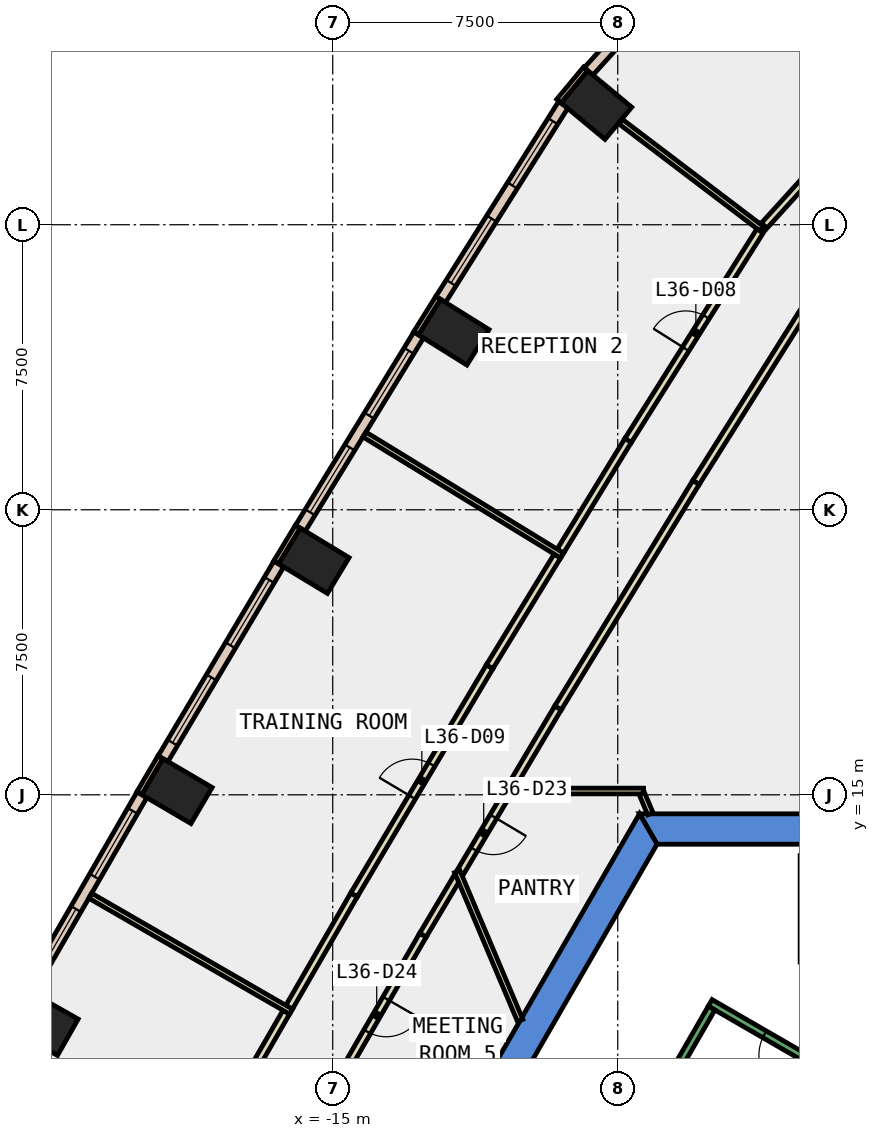
"""IFC4 building model, lengths in metres.
Left out: names, types, materials, properties, quantities, classifications, styles, units other than length and angle.
Written with IfcOpenShell. Run it as: python <this file> out.ifc"""

import sys

from ifc_helpers import new_model, si_unit, direction, frame, frame_2d, origin, origin_2d, place, context, subcontext, project, spatial, polyline, rectangle, outline, extrude, element, fill, save


model = new_model("IFC4")
c1 = context("Model", 3, precision=1e-05, world=origin(), true_north=direction((0.0, 1.0)))
c2 = subcontext(c1, "Body", "Model", "MODEL_VIEW")
j1 = project(units=[si_unit("LENGTHUNIT", "METRE"), si_unit("PLANEANGLEUNIT", "RADIAN")], contexts=[c1])
p1 = place(None, origin())
s1 = spatial("IfcSite", under=j1, at=p1, CompositionType="ELEMENT")
p2 = place(p1, origin())
s2 = spatial("IfcBuilding", under=s1, at=p2, CompositionType="ELEMENT")
p3 = place(p2, frame((0.0, 0.0, 163.4)))
s3 = spatial("IfcBuildingStorey", under=s2, at=p3, CompositionType="ELEMENT", Elevation=163.4)
for number, where, z_axis, x_axis in (
    (1, (-8.061, 33.149, -0.4), (0.0, 0.0, 1.0), (0.639, 0.769, 0.0)),
    (2, (-11.815, 27.172, -0.4), (0.0, 0.0, 1.0), (0.53, 0.848, 0.0)),
    (3, (-15.496, 21.158, -0.4), (0.0, 0.0, 1.0), (0.518, 0.855, 0.0)),
    (4, (-19.099, 15.098, -0.4), (0.0, 0.0, 1.0), (0.506, 0.863, 0.0)),
    (5, (-22.623, 8.991, -0.4), (0.0, 0.0, 1.0), (0.494, 0.869, 0.0)),
):
    element("IfcColumn", number, at=place(p3, frame(where, z_axis=z_axis, x_axis=x_axis)), inside=s3, PredefinedType="COLUMN", context=c2, shape_type="SweptSolid", body=[
        extrude(rectangle(XDim=1.1, YDim=1.5, at=origin_2d()), origin(), (0.0, 0.0, 1.0), 4.2),
    ])
p4 = place(p3, frame((0.0, 0.0, -0.4)))
e6 = element("IfcWall", 6, at=p4, inside=s3, PredefinedType="SHEAR", context=c2, shape_type="SweptSolid", body=[
    extrude(outline(polyline([(6.928, 14.5), (-6.928, 14.5), (-6.466, 13.7), (6.466, 13.7), (6.928, 14.5)])), origin(), (0.0, 0.0, 1.0), 4.2),
])
p5 = place(p3, frame((0.0, 0.0, -0.4)))
e7 = element("IfcWall", 7, at=p5, inside=s3, PredefinedType="SHEAR", context=c2, shape_type="SweptSolid", body=[
    extrude(outline(polyline([(-12.267, 5.252), (-11.575, 4.852), (-6.466, 13.7), (-6.928, 14.5), (-12.267, 5.252)])), origin(), (0.0, 0.0, 1.0), 4.2),
])
for number, where, z_axis, x_axis in (
    (8, (-8.344, 34.099, 0.0), (0.0, 0.0, 1.0), (-0.639, -0.769, 0.0)),
    (9, (-12.223, 28.076, 0.0), (0.0, 0.0, 1.0), (-0.53, -0.848, 0.0)),
    (10, (-15.917, 22.056, 0.0), (0.0, 0.0, 1.0), (-0.518, -0.855, 0.0)),
):
    element("IfcWall", number, at=place(p3, frame(where, z_axis=z_axis, x_axis=x_axis)), inside=s3, PredefinedType="STANDARD", context=c2, shape_type="SweptSolid", body=[
        extrude(rectangle(XDim=1.1, YDim=0.15, at=frame_2d((0.55, 0.0))), origin(), (0.0, 0.0, 1.0), 3.8),
    ])
p6 = place(p3, frame((-19.532, 15.989, 0.0), z_axis=(0.0, 0.0, 1.0), x_axis=(-0.50667077411, -0.862139621327, 0.0)))
e11 = element("IfcWall", 11, at=p6, inside=s3, PredefinedType="STANDARD", context=c2, shape_type="SweptSolid", body=[
    extrude(rectangle(XDim=1.1, YDim=0.15, at=frame_2d((0.55, 0.0))), origin(), (0.0, 0.0, 1.0), 3.8),
])
p7 = place(p3, frame((-5.568, 37.01, 0.0), z_axis=(0.0, 0.0, 1.0), x_axis=(-0.672034341329, -0.740519982225, 0.0)))
e12 = element("IfcWall", 12, at=p7, inside=s3, PredefinedType="STANDARD", context=c2, shape_type="SweptSolid", body=[
    extrude(rectangle(XDim=4.018, YDim=0.3, at=frame_2d((2.009, 0.0))), origin(), (0.0, 0.0, 1.0), 3.8),
])
p8 = place(p7, frame((1.309, 0.0, 0.9)))
e13 = element("IfcOpeningElement", 13, at=p8, cuts=e12, PredefinedType="OPENING", context=c2, shape_type="SweptSolid", body=[
    extrude(rectangle(XDim=1.4, YDim=2.6, at=frame_2d((0.7, 1.3))), frame((0.0, 0.16, 0.0), z_axis=(0.0, -1.0, 0.0), x_axis=(1.0, 0.0, 0.0)), (0.0, 0.0, 1.0), 0.32),
])
p9 = place(p3, frame((-8.932, 33.159, 0.0), z_axis=(0.0, 0.0, 1.0), x_axis=(-0.532721310512, -0.846290733334, 0.0)))
e14 = element("IfcWall", 14, at=p9, inside=s3, PredefinedType="STANDARD", context=c2, shape_type="SweptSolid", body=[
    extrude(rectangle(XDim=6.056, YDim=0.3, at=frame_2d((3.028, 0.0))), origin(), (0.0, 0.0, 1.0), 3.8),
])
p10 = place(p9, frame((0.514, 0.0, 0.9)))
e15 = element("IfcOpeningElement", 15, at=p10, cuts=e14, PredefinedType="OPENING", context=c2, shape_type="SweptSolid", body=[
    extrude(rectangle(XDim=2.0, YDim=2.6, at=frame_2d((1.0, 1.3))), frame((0.0, 0.16, 0.0), z_axis=(0.0, -1.0, 0.0), x_axis=(1.0, 0.0, 0.0)), (0.0, 0.0, 1.0), 0.32),
])
p11 = place(p9, frame((3.542, 0.0, 0.9)))
e16 = element("IfcOpeningElement", 16, at=p11, cuts=e14, PredefinedType="OPENING", context=c2, shape_type="SweptSolid", body=[
    extrude(rectangle(XDim=2.0, YDim=2.6, at=frame_2d((1.0, 1.3))), frame((0.0, 0.16, 0.0), z_axis=(0.0, -1.0, 0.0), x_axis=(1.0, 0.0, 0.0)), (0.0, 0.0, 1.0), 0.32),
])
p12 = place(p3, frame((-12.737, 27.101, 0.0), z_axis=(0.0, 0.0, 1.0), x_axis=(-0.522156898008, -0.852849443842, 0.0)))
e17 = element("IfcWall", 17, at=p12, inside=s3, PredefinedType="STANDARD", context=c2, shape_type="SweptSolid", body=[
    extrude(rectangle(XDim=5.964, YDim=0.3, at=frame_2d((2.982, 0.0))), origin(), (0.0, 0.0, 1.0), 3.8),
])
p13 = place(p12, frame((0.491, 0.0, 0.9)))
e18 = element("IfcOpeningElement", 18, at=p13, cuts=e17, PredefinedType="OPENING", context=c2, shape_type="SweptSolid", body=[
    extrude(rectangle(XDim=2.0, YDim=2.6, at=frame_2d((1.0, 1.3))), frame((0.0, 0.16, 0.0), z_axis=(0.0, -1.0, 0.0), x_axis=(1.0, 0.0, 0.0)), (0.0, 0.0, 1.0), 0.32),
])
p14 = place(p12, frame((3.473, 0.0, 0.9)))
e19 = element("IfcOpeningElement", 19, at=p14, cuts=e17, PredefinedType="OPENING", context=c2, shape_type="SweptSolid", body=[
    extrude(rectangle(XDim=2.0, YDim=2.6, at=frame_2d((1.0, 1.3))), frame((0.0, 0.16, 0.0), z_axis=(0.0, -1.0, 0.0), x_axis=(1.0, 0.0, 0.0)), (0.0, 0.0, 1.0), 0.32),
])
p15 = place(p3, frame((-16.418, 21.074, 0.0), z_axis=(0.0, 0.0, 1.0), x_axis=(-0.511053317394, -0.8595490136, 0.0)))
e20 = element("IfcWall", 20, at=p15, inside=s3, PredefinedType="STANDARD", context=c2, shape_type="SweptSolid", body=[
    extrude(rectangle(XDim=5.962, YDim=0.3, at=frame_2d((2.981, 0.0))), origin(), (0.0, 0.0, 1.0), 3.8),
])
p16 = place(p15, frame((0.491, 0.0, 0.9)))
e21 = element("IfcOpeningElement", 21, at=p16, cuts=e20, PredefinedType="OPENING", context=c2, shape_type="SweptSolid", body=[
    extrude(rectangle(XDim=2.0, YDim=2.6, at=frame_2d((1.0, 1.3))), frame((0.0, 0.16, 0.0), z_axis=(0.0, -1.0, 0.0), x_axis=(1.0, 0.0, 0.0)), (0.0, 0.0, 1.0), 0.32),
])
p17 = place(p15, frame((3.472, 0.0, 0.9)))
e22 = element("IfcOpeningElement", 22, at=p17, cuts=e20, PredefinedType="OPENING", context=c2, shape_type="SweptSolid", body=[
    extrude(rectangle(XDim=2.0, YDim=2.6, at=frame_2d((1.0, 1.3))), frame((0.0, 0.16, 0.0), z_axis=(0.0, -1.0, 0.0), x_axis=(1.0, 0.0, 0.0)), (0.0, 0.0, 1.0), 0.32),
])
p18 = place(p3, frame((-20.02, 15.002, 0.0), z_axis=(0.0, 0.0, 1.0), x_axis=(-0.49986421087, -0.866103787482, 0.0)))
e23 = element("IfcWall", 23, at=p18, inside=s3, PredefinedType="STANDARD", context=c2, shape_type="SweptSolid", body=[
    extrude(rectangle(XDim=5.964, YDim=0.3, at=frame_2d((2.982, 0.0))), origin(), (0.0, 0.0, 1.0), 3.8),
])
p19 = place(p18, frame((0.491, 0.0, 0.9)))
e24 = element("IfcOpeningElement", 24, at=p19, cuts=e23, PredefinedType="OPENING", context=c2, shape_type="SweptSolid", body=[
    extrude(rectangle(XDim=2.0, YDim=2.6, at=frame_2d((1.0, 1.3))), frame((0.0, 0.16, 0.0), z_axis=(0.0, -1.0, 0.0), x_axis=(1.0, 0.0, 0.0)), (0.0, 0.0, 1.0), 0.32),
])
p20 = place(p18, frame((3.473, 0.0, 0.9)))
e25 = element("IfcOpeningElement", 25, at=p20, cuts=e23, PredefinedType="OPENING", context=c2, shape_type="SweptSolid", body=[
    extrude(rectangle(XDim=2.0, YDim=2.6, at=frame_2d((1.0, 1.3))), frame((0.0, 0.16, 0.0), z_axis=(0.0, -1.0, 0.0), x_axis=(1.0, 0.0, 0.0)), (0.0, 0.0, 1.0), 0.32),
])
p21 = place(p3, frame((-10.41, 15.036, 0.0), z_axis=(0.0, 0.0, 1.0), x_axis=(-0.510900085603, -0.859640100583, 0.0)))
e26 = element("IfcWall", 26, at=p21, inside=s3, PredefinedType="PARTITIONING", context=c2, shape_type="SweptSolid", body=[
    extrude(rectangle(XDim=2.419, YDim=0.2, at=frame_2d((1.21, 0.0))), origin(), (0.0, 0.0, 1.0), 3.8),
])
p22 = place(p21, frame((0.709, 0.0, 0.0)))
e27 = element("IfcOpeningElement", 27, at=p22, cuts=e26, PredefinedType="OPENING", context=c2, shape_type="SweptSolid", body=[
    extrude(rectangle(XDim=1.0, YDim=2.1, at=frame_2d((0.5, 1.05))), frame((0.0, 0.11, 0.0), z_axis=(0.0, -1.0, 0.0), x_axis=(1.0, 0.0, 0.0)), (0.0, 0.0, 1.0), 0.22),
])
p23 = place(p3, frame((-11.723, 12.827, 0.0), z_axis=(0.0, 0.0, 1.0), x_axis=(-0.511182890129, -0.859471961637, 0.0)))
e28 = element("IfcWall", 28, at=p23, inside=s3, PredefinedType="PARTITIONING", context=c2, shape_type="SweptSolid", body=[
    extrude(rectangle(XDim=1.769, YDim=0.2, at=frame_2d((0.884, 0.0))), origin(), (0.0, 0.0, 1.0), 3.8),
])
p24 = place(p3, frame((-12.627, 11.307, 0.0), z_axis=(0.0, 0.0, 1.0), x_axis=(-0.499907870494, -0.866078588246, 0.0)))
e29 = element("IfcWall", 29, at=p24, inside=s3, PredefinedType="PARTITIONING", context=c2, shape_type="SweptSolid", body=[
    extrude(rectangle(XDim=4.863, YDim=0.2, at=frame_2d((2.432, 0.0))), origin(), (0.0, 0.0, 1.0), 3.8),
])
p25 = place(p24, frame((1.932, 0.0, 0.0)))
e30 = element("IfcOpeningElement", 30, at=p25, cuts=e29, PredefinedType="OPENING", context=c2, shape_type="SweptSolid", body=[
    extrude(rectangle(XDim=1.0, YDim=2.1, at=frame_2d((0.5, 1.05))), frame((0.0, 0.11, 0.0), z_axis=(0.0, -1.0, 0.0), x_axis=(1.0, 0.0, 0.0)), (0.0, 0.0, 1.0), 0.22),
])
p26 = place(p3, frame((-1.984, 28.709, 0.0), z_axis=(0.0, 0.0, 1.0), x_axis=(-0.532786324951, -0.846249804694, 0.0)))
e31 = element("IfcWall", 31, at=p26, inside=s3, PredefinedType="PARTITIONING", context=c2, shape_type="SweptSolid", body=[
    extrude(rectangle(XDim=6.489, YDim=0.2, at=frame_2d((3.244, 0.0))), origin(), (0.0, 0.0, 1.0), 3.8),
])
p27 = place(p3, frame((-5.441, 23.218, 0.0), z_axis=(0.0, 0.0, 1.0), x_axis=(-0.522108536257, -0.85287905143, 0.0)))
e32 = element("IfcWall", 32, at=p27, inside=s3, PredefinedType="PARTITIONING", context=c2, shape_type="SweptSolid", body=[
    extrude(rectangle(XDim=6.957, YDim=0.2, at=frame_2d((3.478, 0.0))), origin(), (0.0, 0.0, 1.0), 3.8),
])
p28 = place(p3, frame((-9.073, 17.285, 0.0), z_axis=(0.0, 0.0, 1.0), x_axis=(-0.51105761127, -0.859546460619, 0.0)))
e33 = element("IfcWall", 33, at=p28, inside=s3, PredefinedType="PARTITIONING", context=c2, shape_type="SweptSolid", body=[
    extrude(rectangle(XDim=2.467, YDim=0.2, at=frame_2d((1.234, 0.0))), origin(), (0.0, 0.0, 1.0), 3.8),
])
p29 = place(p3, frame((-3.649, 29.973, 0.0), z_axis=(0.0, 0.0, 1.0), x_axis=(0.671957285765, 0.740589904135, 0.0)))
e34 = element("IfcWall", 34, at=p29, inside=s3, PredefinedType="PARTITIONING", context=c2, shape_type="SweptSolid", body=[
    extrude(rectangle(XDim=2.888, YDim=0.2, at=frame_2d((1.444, 0.0))), origin(), (0.0, 0.0, 1.0), 3.8),
])
p30 = place(p3, frame((-9.01, 21.411, 0.0), z_axis=(0.0, 0.0, 1.0), x_axis=(0.52198736623, 0.852953216476, 0.0)))
e35 = element("IfcWall", 35, at=p30, inside=s3, PredefinedType="PARTITIONING", context=c2, shape_type="SweptSolid", body=[
    extrude(rectangle(XDim=3.417, YDim=0.2, at=frame_2d((1.709, 0.0))), origin(), (0.0, 0.0, 1.0), 3.8),
])
p31 = place(p3, frame((-7.226, 24.326, 0.0), z_axis=(0.0, 0.0, 1.0), x_axis=(0.532874279134, 0.846194423662, 0.0)))
e36 = element("IfcWall", 36, at=p31, inside=s3, PredefinedType="PARTITIONING", context=c2, shape_type="SweptSolid", body=[
    extrude(rectangle(XDim=6.686, YDim=0.2, at=frame_2d((3.343, 0.0))), origin(), (0.0, 0.0, 1.0), 3.8),
])
p32 = place(p31, frame((2.843, 0.0, 0.0)))
e37 = element("IfcOpeningElement", 37, at=p32, cuts=e36, PredefinedType="OPENING", context=c2, shape_type="SweptSolid", body=[
    extrude(rectangle(XDim=1.0, YDim=2.1, at=frame_2d((0.5, 1.05))), frame((0.0, 0.11, 0.0), z_axis=(0.0, -1.0, 0.0), x_axis=(1.0, 0.0, 0.0)), (0.0, 0.0, 1.0), 0.22),
])
p33 = place(p3, frame((-16.147, 9.41, 0.0), z_axis=(0.0, 0.0, 1.0), x_axis=(0.500044178772, 0.865999895656, 0.0)))
e38 = element("IfcWall", 38, at=p33, inside=s3, PredefinedType="PARTITIONING", context=c2, shape_type="SweptSolid", body=[
    extrude(rectangle(XDim=3.416, YDim=0.2, at=frame_2d((1.708, 0.0))), origin(), (0.0, 0.0, 1.0), 3.8),
])
p34 = place(p3, frame((-14.439, 12.368, 0.0), z_axis=(0.0, 0.0, 1.0), x_axis=(0.51096926939, 0.859598979606, 0.0)))
e39 = element("IfcWall", 39, at=p34, inside=s3, PredefinedType="PARTITIONING", context=c2, shape_type="SweptSolid", body=[
    extrude(rectangle(XDim=6.983, YDim=0.2, at=frame_2d((3.491, 0.0))), origin(), (0.0, 0.0, 1.0), 3.8),
])
p35 = place(p34, frame((2.991, 0.0, 0.0)))
e40 = element("IfcOpeningElement", 40, at=p35, cuts=e39, PredefinedType="OPENING", context=c2, shape_type="SweptSolid", body=[
    extrude(rectangle(XDim=1.0, YDim=2.1, at=frame_2d((0.5, 1.05))), frame((0.0, 0.11, 0.0), z_axis=(0.0, -1.0, 0.0), x_axis=(1.0, 0.0, 0.0)), (0.0, 0.0, 1.0), 0.22),
])
p36 = place(p3, frame((-10.871, 18.37, 0.0), z_axis=(0.0, 0.0, 1.0), x_axis=(0.522117781608, 0.852873391617, 0.0)))
e41 = element("IfcWall", 41, at=p36, inside=s3, PredefinedType="PARTITIONING", context=c2, shape_type="SweptSolid", body=[
    extrude(rectangle(XDim=3.415, YDim=0.2, at=frame_2d((1.708, 0.0))), origin(), (0.0, 0.0, 1.0), 3.8),
])
p37 = place(p3, frame((-17.93, 6.321, 0.0), z_axis=(0.0, 0.0, 1.0), x_axis=(0.499920397431, 0.866071357471, 0.0)))
e42 = element("IfcWall", 42, at=p37, inside=s3, PredefinedType="PARTITIONING", context=c2, shape_type="SweptSolid", body=[
    extrude(rectangle(XDim=3.417, YDim=0.2, at=frame_2d((1.708, 0.0))), origin(), (0.0, 0.0, 1.0), 3.8),
])
p38 = place(p3, frame((-10.068, 9.062, 0.0), z_axis=(0.0, 0.0, 1.0), x_axis=(-0.388992587102, 0.921240884448, 0.0)))
e43 = element("IfcWall", 43, at=p38, inside=s3, PredefinedType="PARTITIONING", context=c2, shape_type="SweptSolid", body=[
    extrude(rectangle(XDim=4.257, YDim=0.15, at=frame_2d((2.128, 0.0))), origin(), (0.0, 0.0, 1.0), 3.8),
])
p39 = place(p3, frame((-6.82, 15.1, 0.0), z_axis=(0.0, 0.0, 1.0), x_axis=(-1.0, 0.0, 0.0)))
e44 = element("IfcWall", 44, at=p39, inside=s3, PredefinedType="PARTITIONING", context=c2, shape_type="SweptSolid", body=[
    extrude(rectangle(XDim=3.652, YDim=0.15, at=frame_2d((1.826, 0.0))), origin(), (0.0, 0.0, 1.0), 3.8),
])
p40 = place(p3, frame((-6.641, 14.5, 0.0), z_axis=(0.0, 0.0, 1.0), x_axis=(-0.389930013825, 0.920844495188, 0.0)))
e45 = element("IfcWall", 45, at=p40, inside=s3, PredefinedType="PARTITIONING", context=c2, shape_type="SweptSolid", body=[
    extrude(rectangle(XDim=0.577, YDim=0.15, at=frame_2d((0.288, 0.0))), origin(), (0.0, 0.0, 1.0), 3.8),
])
p41 = place(p3, frame((-3.716, 29.899, 0.0), z_axis=(0.0, 0.0, 1.0), x_axis=(-0.796435085709, 0.604724031481, 0.0)))
e46 = element("IfcWall", 46, at=p41, inside=s3, PredefinedType="PARTITIONING", context=c2, shape_type="SweptSolid", body=[
    extrude(rectangle(XDim=4.653, YDim=0.15, at=frame_2d((2.327, 0.0))), origin(), (0.0, 0.0, 1.0), 3.8),
])
p42 = place(p3, frame((-8.964, 21.295, 0.0), z_axis=(0.0, 0.0, 1.0), x_axis=(-0.852835298101, 0.522180001832, 0.0)))
e47 = element("IfcWall", 47, at=p42, inside=s3, PredefinedType="PARTITIONING", context=c2, shape_type="SweptSolid", body=[
    extrude(rectangle(XDim=6.1, YDim=0.15, at=frame_2d((3.05, 0.0))), origin(), (0.0, 0.0, 1.0), 3.8),
])
p43 = place(p3, frame((-16.098, 9.295, 0.0), z_axis=(0.0, 0.0, 1.0), x_axis=(-0.866109615698, 0.499854112313, 0.0)))
e48 = element("IfcWall", 48, at=p43, inside=s3, PredefinedType="PARTITIONING", context=c2, shape_type="SweptSolid", body=[
    extrude(rectangle(XDim=6.1, YDim=0.15, at=frame_2d((3.05, 0.0))), origin(), (0.0, 0.0, 1.0), 3.8),
])
p44 = place(p3, frame((-1.256, 7.324, 0.0), z_axis=(0.0, 0.0, 1.0), x_axis=(-0.866046073146, 0.499964197906, 0.0)))
e49 = element("IfcWall", 49, at=p44, inside=s3, PredefinedType="STANDARD", context=c2, shape_type="SweptSolid", body=[
    extrude(rectangle(XDim=4.4, YDim=0.2, at=frame_2d((2.2, 0.0))), origin(), (0.0, 0.0, 1.0), 3.8),
])
p45 = place(p44, frame((1.65, 0.0, 0.0)))
e50 = element("IfcOpeningElement", 50, at=p45, cuts=e49, PredefinedType="OPENING", context=c2, shape_type="SweptSolid", body=[
    extrude(rectangle(XDim=1.1, YDim=2.2, at=frame_2d((0.55, 1.1))), frame((0.0, 0.11, 0.0), z_axis=(0.0, -1.0, 0.0), x_axis=(1.0, 0.0, 0.0)), (0.0, 0.0, 1.0), 0.22),
])
p46 = place(p3, frame((-5.03, 9.388, 0.0), z_axis=(0.0, 0.0, 1.0), x_axis=(-0.499978703459, -0.866037698999, 0.0)))
e51 = element("IfcWall", 51, at=p46, inside=s3, PredefinedType="STANDARD", context=c2, shape_type="SweptSolid", body=[
    extrude(rectangle(XDim=6.9, YDim=0.2, at=frame_2d((3.45, 0.0))), origin(), (0.0, 0.0, 1.0), 3.8),
])
p47 = place(p10, origin())
e52 = element("IfcWindow", 52, at=p47, inside=s3, PartitioningType="SINGLE_PANEL", PredefinedType="WINDOW", context=c2, shape_type="SweptSolid", body=[
    extrude(rectangle(XDim=2.0, YDim=2.6, at=frame_2d((1.0, 1.3))), frame((0.0, 0.03, 0.0), z_axis=(0.0, -1.0, 0.0), x_axis=(1.0, 0.0, 0.0)), (0.0, 0.0, 1.0), 0.06),
])
fill(e15, e52)
p48 = place(p11, origin())
e53 = element("IfcWindow", 53, at=p48, inside=s3, PartitioningType="SINGLE_PANEL", PredefinedType="WINDOW", context=c2, shape_type="SweptSolid", body=[
    extrude(rectangle(XDim=2.0, YDim=2.6, at=frame_2d((1.0, 1.3))), frame((0.0, 0.03, 0.0), z_axis=(0.0, -1.0, 0.0), x_axis=(1.0, 0.0, 0.0)), (0.0, 0.0, 1.0), 0.06),
])
fill(e16, e53)
p49 = place(p13, origin())
e54 = element("IfcWindow", 54, at=p49, inside=s3, PartitioningType="SINGLE_PANEL", PredefinedType="WINDOW", context=c2, shape_type="SweptSolid", body=[
    extrude(rectangle(XDim=2.0, YDim=2.6, at=frame_2d((1.0, 1.3))), frame((0.0, 0.03, 0.0), z_axis=(0.0, -1.0, 0.0), x_axis=(1.0, 0.0, 0.0)), (0.0, 0.0, 1.0), 0.06),
])
fill(e18, e54)
p50 = place(p14, origin())
e55 = element("IfcWindow", 55, at=p50, inside=s3, PartitioningType="SINGLE_PANEL", PredefinedType="WINDOW", context=c2, shape_type="SweptSolid", body=[
    extrude(rectangle(XDim=2.0, YDim=2.6, at=frame_2d((1.0, 1.3))), frame((0.0, 0.03, 0.0), z_axis=(0.0, -1.0, 0.0), x_axis=(1.0, 0.0, 0.0)), (0.0, 0.0, 1.0), 0.06),
])
fill(e19, e55)
p51 = place(p16, origin())
e56 = element("IfcWindow", 56, at=p51, inside=s3, PartitioningType="SINGLE_PANEL", PredefinedType="WINDOW", context=c2, shape_type="SweptSolid", body=[
    extrude(rectangle(XDim=2.0, YDim=2.6, at=frame_2d((1.0, 1.3))), frame((0.0, 0.03, 0.0), z_axis=(0.0, -1.0, 0.0), x_axis=(1.0, 0.0, 0.0)), (0.0, 0.0, 1.0), 0.06),
])
fill(e21, e56)
p52 = place(p17, origin())
e57 = element("IfcWindow", 57, at=p52, inside=s3, PartitioningType="SINGLE_PANEL", PredefinedType="WINDOW", context=c2, shape_type="SweptSolid", body=[
    extrude(rectangle(XDim=2.0, YDim=2.6, at=frame_2d((1.0, 1.3))), frame((0.0, 0.03, 0.0), z_axis=(0.0, -1.0, 0.0), x_axis=(1.0, 0.0, 0.0)), (0.0, 0.0, 1.0), 0.06),
])
fill(e22, e57)
p53 = place(p19, origin())
e58 = element("IfcWindow", 58, at=p53, inside=s3, PartitioningType="SINGLE_PANEL", PredefinedType="WINDOW", context=c2, shape_type="SweptSolid", body=[
    extrude(rectangle(XDim=2.0, YDim=2.6, at=frame_2d((1.0, 1.3))), frame((0.0, 0.03, 0.0), z_axis=(0.0, -1.0, 0.0), x_axis=(1.0, 0.0, 0.0)), (0.0, 0.0, 1.0), 0.06),
])
fill(e24, e58)
p54 = place(p20, origin())
e59 = element("IfcWindow", 59, at=p54, inside=s3, PartitioningType="SINGLE_PANEL", PredefinedType="WINDOW", context=c2, shape_type="SweptSolid", body=[
    extrude(rectangle(XDim=2.0, YDim=2.6, at=frame_2d((1.0, 1.3))), frame((0.0, 0.03, 0.0), z_axis=(0.0, -1.0, 0.0), x_axis=(1.0, 0.0, 0.0)), (0.0, 0.0, 1.0), 0.06),
])
fill(e25, e59)
p55 = place(p32, origin())
e60 = element("IfcDoor", 60, at=p55, inside=s3, OperationType="SINGLE_SWING_LEFT", PredefinedType="DOOR", context=c2, shape_type="SweptSolid", body=[
    extrude(rectangle(XDim=1.0, YDim=2.1, at=frame_2d((0.5, 1.05))), frame((0.0, 0.025, 0.0), z_axis=(0.0, -1.0, 0.0), x_axis=(1.0, 0.0, 0.0)), (0.0, 0.0, 1.0), 0.05),
])
fill(e37, e60)
p56 = place(p35, origin())
e61 = element("IfcDoor", 61, at=p56, inside=s3, OperationType="SINGLE_SWING_LEFT", PredefinedType="DOOR", context=c2, shape_type="SweptSolid", body=[
    extrude(rectangle(XDim=1.0, YDim=2.1, at=frame_2d((0.5, 1.05))), frame((0.0, 0.025, 0.0), z_axis=(0.0, -1.0, 0.0), x_axis=(1.0, 0.0, 0.0)), (0.0, 0.0, 1.0), 0.05),
])
fill(e40, e61)
p57 = place(p22, origin())
e62 = element("IfcDoor", 62, at=p57, inside=s3, OperationType="SINGLE_SWING_LEFT", PredefinedType="DOOR", context=c2, shape_type="SweptSolid", body=[
    extrude(rectangle(XDim=1.0, YDim=2.1, at=frame_2d((0.5, 1.05))), frame((0.0, 0.025, 0.0), z_axis=(0.0, -1.0, 0.0), x_axis=(1.0, 0.0, 0.0)), (0.0, 0.0, 1.0), 0.05),
])
fill(e27, e62)
p58 = place(p25, origin())
e63 = element("IfcDoor", 63, at=p58, inside=s3, OperationType="SINGLE_SWING_LEFT", PredefinedType="DOOR", context=c2, shape_type="SweptSolid", body=[
    extrude(rectangle(XDim=1.0, YDim=2.1, at=frame_2d((0.5, 1.05))), frame((0.0, 0.025, 0.0), z_axis=(0.0, -1.0, 0.0), x_axis=(1.0, 0.0, 0.0)), (0.0, 0.0, 1.0), 0.05),
])
fill(e30, e63)
p59 = place(p45, origin())
e64 = element("IfcDoor", 64, at=p59, inside=s3, OperationType="SINGLE_SWING_LEFT", PredefinedType="DOOR", context=c2, shape_type="SweptSolid", body=[
    extrude(rectangle(XDim=1.1, YDim=2.2, at=frame_2d((0.55, 1.1))), frame((0.0, 0.025, 0.0), z_axis=(0.0, -1.0, 0.0), x_axis=(1.0, 0.0, 0.0)), (0.0, 0.0, 1.0), 0.05),
])
fill(e50, e64)
save(model, sys.argv[1])
